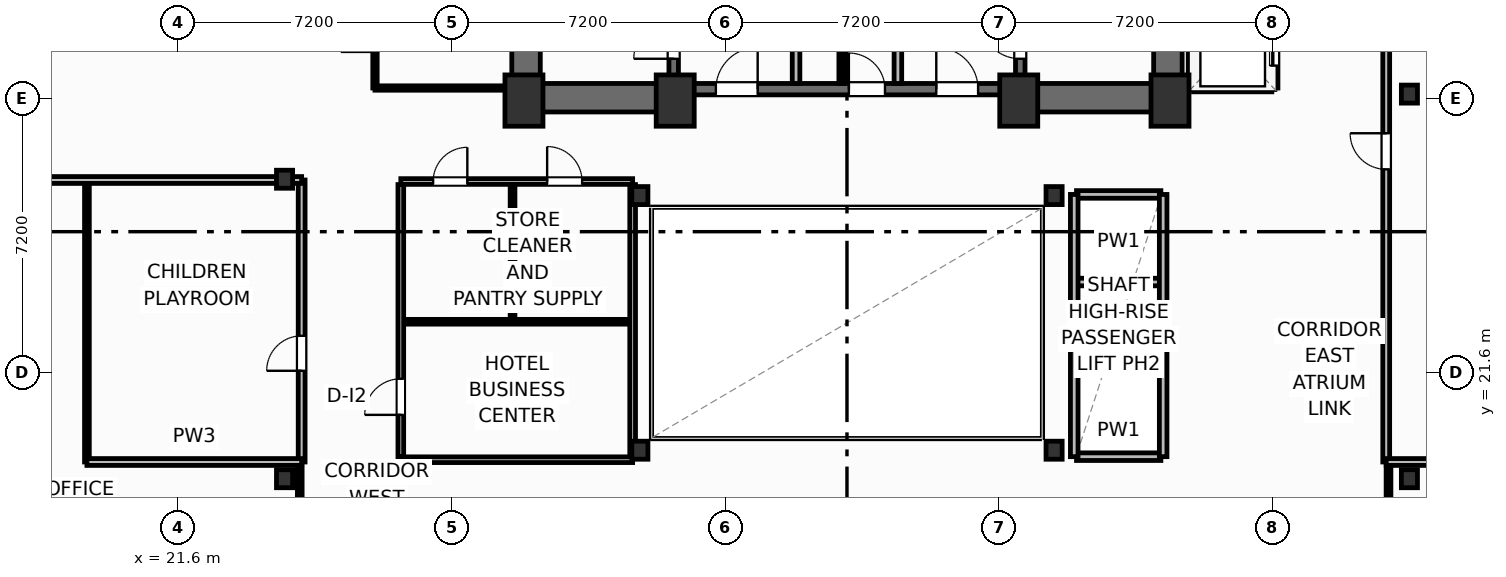
"""IFC4 building model, lengths in metres.
Left out: names, types, materials, properties, quantities, classifications, styles, units other than length and angle.
Written with IfcOpenShell. Run it as: python <this file> out.ifc"""

import sys

from ifc_helpers import new_model, si_unit, direction, frame, frame_2d, origin, origin_2d, place, context, subcontext, project, spatial, rectangle, i_section, extrude, element, fill, save


model = new_model("IFC4")
c1 = context("Model", 3, precision=1e-05, world=origin(), true_north=direction((0.0, 1.0)))
c2 = subcontext(c1, "Body", "Model", "MODEL_VIEW")
j1 = project(units=[si_unit("LENGTHUNIT", "METRE"), si_unit("PLANEANGLEUNIT", "RADIAN")], contexts=[c1])
p1 = place(None, origin())
s1 = spatial("IfcSite", under=j1, at=p1, CompositionType="ELEMENT")
p2 = place(p1, origin())
s2 = spatial("IfcBuilding", under=s1, at=p2, CompositionType="ELEMENT")
p3 = place(p2, frame((0.0, 0.0, 140.2)))
s3 = spatial("IfcBuildingStorey", under=s2, at=p3, CompositionType="ELEMENT", Elevation=140.2)
for number, where, z_axis, x_axis in (
    (1, (30.7, 28.75, 0.0), (0.0, 0.0, 1.0), (1.0, 0.0, 0.0)),
    (2, (34.68, 28.75, 0.0), (0.0, 0.0, 1.0), (1.0, 0.0, 0.0)),
    (3, (43.72, 28.75, 0.0), (0.0, 0.0, 1.0), (1.0, 0.0, 0.0)),
    (4, (47.7, 28.75, 0.0), (0.0, 0.0, 1.0), (1.0, 0.0, 0.0)),
):
    element("IfcColumn", number, at=place(p3, frame(where, z_axis=z_axis, x_axis=x_axis)), inside=s3, PredefinedType="COLUMN", context=c2, shape_type="SweptSolid", body=[
        extrude(rectangle(XDim=1.0, YDim=1.35, at=origin_2d()), origin(), (0.0, 0.0, 1.0), 3.7),
    ])
for number, where, z_axis, x_axis in (
    (5, (33.75, 19.55, 0.0), (0.0, 0.0, 1.0), (1.0, 0.0, 0.0)),
    (6, (44.65, 19.55, 0.0), (0.0, 0.0, 1.0), (1.0, 0.0, 0.0)),
    (7, (33.75, 26.25, 0.0), (0.0, 0.0, 1.0), (1.0, 0.0, 0.0)),
    (8, (44.65, 26.25, 0.0), (0.0, 0.0, 1.0), (1.0, 0.0, 0.0)),
    (9, (24.4, 18.8, 0.0), (0.0, 0.0, 1.0), (1.0, 0.0, 0.0)),
    (10, (24.4, 26.68, 0.0), (0.0, 0.0, 1.0), (1.0, 0.0, 0.0)),
    (11, (54.0, 18.8, 0.0), (0.0, 0.0, 1.0), (1.0, 0.0, 0.0)),
    (12, (54.0, 28.92, 0.0), (0.0, 0.0, 1.0), (1.0, 0.0, 0.0)),
):
    element("IfcColumn", number, at=place(p3, frame(where, z_axis=z_axis, x_axis=x_axis)), inside=s3, PredefinedType="COLUMN", context=c2, shape_type="SweptSolid", body=[
        extrude(i_section(OverallWidth=0.424, OverallDepth=0.474, WebThickness=0.048, FlangeThickness=0.077, FilletRadius=0.025, at=origin_2d()), origin(), (0.0, 0.0, 1.0), 3.7),
    ])
for number, where, z_axis, x_axis in (
    (13, (30.755, 29.2, 0.0), (0.0, 0.0, 1.0), (0.0, 1.0, 0.0)),
    (14, (47.645, 29.2, 0.0), (0.0, 0.0, 1.0), (0.0, 1.0, 0.0)),
):
    element("IfcWall", number, at=place(p3, frame(where, z_axis=z_axis, x_axis=x_axis)), inside=s3, PredefinedType="SHEAR", context=c2, shape_type="SweptSolid", body=[
        extrude(rectangle(XDim=9.22, YDim=0.75, at=frame_2d((4.61, 0.0))), origin(), (0.0, 0.0, 1.0), 3.45),
    ])
p4 = place(p3, frame((30.38, 28.825, 0.0), z_axis=(0.0, 0.0, 1.0), x_axis=(1.0, 0.0, 0.0)))
e15 = element("IfcWall", 15, at=p4, inside=s3, PredefinedType="SHEAR", context=c2, shape_type="SweptSolid", body=[
    extrude(rectangle(XDim=4.42, YDim=0.75, at=frame_2d((2.21, 0.0))), origin(), (0.0, 0.0, 1.0), 3.45),
])
p5 = place(p3, frame((43.6, 28.825, 0.0), z_axis=(0.0, 0.0, 1.0), x_axis=(1.0, 0.0, 0.0)))
e16 = element("IfcWall", 16, at=p5, inside=s3, PredefinedType="SHEAR", context=c2, shape_type="SweptSolid", body=[
    extrude(rectangle(XDim=4.42, YDim=0.75, at=frame_2d((2.21, 0.0))), origin(), (0.0, 0.0, 1.0), 3.45),
])
p6 = place(p3, frame((34.8, 29.05, 0.0), z_axis=(0.0, 0.0, 1.0), x_axis=(1.0, 0.0, 0.0)))
e17 = element("IfcWall", 17, at=p6, inside=s3, PredefinedType="SHEAR", context=c2, shape_type="SweptSolid", body=[
    extrude(rectangle(XDim=8.8, YDim=0.3, at=frame_2d((4.4, 0.0))), origin(), (0.0, 0.0, 1.0), 3.45),
])
p7 = place(p6, frame((0.95, 0.0, 0.0)))
e18 = element("IfcOpeningElement", 18, at=p7, cuts=e17, PredefinedType="OPENING", context=c2, shape_type="SweptSolid", body=[
    extrude(rectangle(XDim=1.1, YDim=2.15, at=frame_2d((0.55, 1.075))), frame((0.0, 0.16, 0.0), z_axis=(0.0, -1.0, 0.0), x_axis=(1.0, 0.0, 0.0)), (0.0, 0.0, 1.0), 0.32),
])
p8 = place(p6, frame((6.75, 0.0, 0.0)))
e19 = element("IfcOpeningElement", 19, at=p8, cuts=e17, PredefinedType="OPENING", context=c2, shape_type="SweptSolid", body=[
    extrude(rectangle(XDim=1.1, YDim=2.15, at=frame_2d((0.55, 1.075))), frame((0.0, 0.16, 0.0), z_axis=(0.0, -1.0, 0.0), x_axis=(1.0, 0.0, 0.0)), (0.0, 0.0, 1.0), 0.32),
])
p9 = place(p6, frame((4.45, 0.0, 0.0)))
e20 = element("IfcOpeningElement", 20, at=p9, cuts=e17, PredefinedType="OPENING", context=c2, shape_type="SweptSolid", body=[
    extrude(rectangle(XDim=0.95, YDim=2.15, at=frame_2d((0.475, 1.075))), frame((0.0, 0.16, 0.0), z_axis=(0.0, -1.0, 0.0), x_axis=(1.0, 0.0, 0.0)), (0.0, 0.0, 1.0), 0.32),
])
p10 = place(p3, frame((34.64, 29.2, 0.0), z_axis=(0.0, 0.0, 1.0), x_axis=(0.0, 1.0, 0.0)))
e21 = element("IfcWall", 21, at=p10, inside=s3, PredefinedType="SHEAR", context=c2, shape_type="SweptSolid", body=[
    extrude(rectangle(XDim=9.22, YDim=0.25, at=frame_2d((4.61, 0.0))), origin(), (0.0, 0.0, 1.0), 3.45),
])
p11 = place(p10, frame((0.65, 0.0, 0.0)))
e22 = element("IfcOpeningElement", 22, at=p11, cuts=e21, PredefinedType="OPENING", context=c2, shape_type="SweptSolid", body=[
    extrude(rectangle(XDim=1.05, YDim=2.15, at=frame_2d((0.525, 1.075))), frame((0.0, 0.135, 0.0), z_axis=(0.0, -1.0, 0.0), x_axis=(1.0, 0.0, 0.0)), (0.0, 0.0, 1.0), 0.27),
])
p12 = place(p3, frame((43.76, 29.2, 0.0), z_axis=(0.0, 0.0, 1.0), x_axis=(0.0, 1.0, 0.0)))
e23 = element("IfcWall", 23, at=p12, inside=s3, PredefinedType="SHEAR", context=c2, shape_type="SweptSolid", body=[
    extrude(rectangle(XDim=9.22, YDim=0.25, at=frame_2d((4.61, 0.0))), origin(), (0.0, 0.0, 1.0), 3.45),
])
p13 = place(p12, frame((0.65, 0.0, 0.0)))
e24 = element("IfcOpeningElement", 24, at=p13, cuts=e23, PredefinedType="OPENING", context=c2, shape_type="SweptSolid", body=[
    extrude(rectangle(XDim=1.05, YDim=2.15, at=frame_2d((0.525, 1.075))), frame((0.0, 0.135, 0.0), z_axis=(0.0, -1.0, 0.0), x_axis=(1.0, 0.0, 0.0)), (0.0, 0.0, 1.0), 0.27),
])
p14 = place(p3, frame((24.8, 16.61, 0.0), z_axis=(0.0, 0.0, 1.0), x_axis=(0.0, 1.0, 0.0)))
e25 = element("IfcWall", 25, at=p14, inside=s3, PredefinedType="PARTITIONING", context=c2, shape_type="SweptSolid", body=[
    extrude(rectangle(XDim=2.63, YDim=0.125, at=frame_2d((1.315, 0.0))), origin(), (0.0, 0.0, 1.0), 2.662),
])
p15 = place(p3, frame((53.45, 16.61, 0.0), z_axis=(0.0, 0.0, 1.0), x_axis=(0.0, 1.0, 0.0)))
e26 = element("IfcWall", 26, at=p15, inside=s3, PredefinedType="PARTITIONING", context=c2, shape_type="SweptSolid", body=[
    extrude(rectangle(XDim=2.63, YDim=0.125, at=frame_2d((1.315, 0.0))), origin(), (0.0, 0.0, 1.0), 3.45),
])
p16 = place(p3, frame((24.85, 19.24, 0.0), z_axis=(0.0, 0.0, 1.0), x_axis=(0.0, 1.0, 0.0)))
e27 = element("IfcWall", 27, at=p16, inside=s3, PredefinedType="PARTITIONING", context=c2, shape_type="SweptSolid", body=[
    extrude(rectangle(XDim=7.42, YDim=0.18, at=frame_2d((3.71, 0.0))), origin(), (0.0, 0.0, 1.0), 3.45),
])
p17 = place(p16, frame((2.4, 0.0, 0.0)))
e28 = element("IfcOpeningElement", 28, at=p17, cuts=e27, PredefinedType="OPENING", context=c2, shape_type="SweptSolid", body=[
    extrude(rectangle(XDim=0.92, YDim=2.05, at=frame_2d((0.46, 1.025))), frame((0.0, 0.1, 0.0), z_axis=(0.0, -1.0, 0.0), x_axis=(1.0, 0.0, 0.0)), (0.0, 0.0, 1.0), 0.2),
])
p18 = place(p3, frame((19.2, 19.24, 0.0), z_axis=(0.0, 0.0, 1.0), x_axis=(0.0, 1.0, 0.0)))
e29 = element("IfcWall", 29, at=p18, inside=s3, PredefinedType="PARTITIONING", context=c2, shape_type="SweptSolid", body=[
    extrude(rectangle(XDim=7.42, YDim=0.125, at=frame_2d((3.71, 0.0))), origin(), (0.0, 0.0, 1.0), 3.45),
])
p19 = place(p3, frame((19.2, 19.24, 0.0), z_axis=(0.0, 0.0, 1.0), x_axis=(1.0, 0.0, 0.0)))
e30 = element("IfcWall", 30, at=p19, inside=s3, PredefinedType="PARTITIONING", context=c2, shape_type="SweptSolid", body=[
    extrude(rectangle(XDim=5.65, YDim=0.18, at=frame_2d((2.825, 0.0))), origin(), (0.0, 0.0, 1.0), 3.45),
])
p20 = place(p3, frame((2.073, 26.66, 0.0), z_axis=(0.0, 0.0, 1.0), x_axis=(1.0, 0.0, 0.0)))
e31 = element("IfcWall", 31, at=p20, inside=s3, PredefinedType="PARTITIONING", context=c2, shape_type="SweptSolid", body=[
    extrude(rectangle(XDim=22.777, YDim=0.18, at=frame_2d((11.388, 0.0))), origin(), (0.0, 0.0, 1.0), 2.662),
])
p21 = place(p3, frame((53.39, 19.24, 0.0), z_axis=(0.0, 0.0, 1.0), x_axis=(0.0, 1.0, 0.0)))
e32 = element("IfcWall", 32, at=p21, inside=s3, PredefinedType="PARTITIONING", context=c2, shape_type="SweptSolid", body=[
    extrude(rectangle(XDim=20.06, YDim=0.18, at=frame_2d((10.03, 0.0))), origin(), (0.0, 0.0, 1.0), 3.45),
])
p22 = place(p21, frame((7.7, 0.0, 0.0)))
e33 = element("IfcOpeningElement", 33, at=p22, cuts=e32, PredefinedType="OPENING", context=c2, shape_type="SweptSolid", body=[
    extrude(rectangle(XDim=0.95, YDim=2.05, at=frame_2d((0.475, 1.025))), frame((0.0, 0.1, 0.0), z_axis=(0.0, -1.0, 0.0), x_axis=(1.0, 0.0, 0.0)), (0.0, 0.0, 1.0), 0.2),
])
p23 = place(p3, frame((53.39, 19.24, 0.0), z_axis=(0.0, 0.0, 1.0), x_axis=(1.0, 0.0, 0.0)))
e34 = element("IfcWall", 34, at=p23, inside=s3, PredefinedType="PARTITIONING", context=c2, shape_type="SweptSolid", body=[
    extrude(rectangle(XDim=22.367, YDim=0.18, at=frame_2d((11.183, 0.0))), origin(), (0.0, 0.0, 1.0), 2.662),
])
for number, where, z_axis, x_axis in (
    (35, (37.86, 29.2, 0.0), (0.0, 0.0, 1.0), (0.0, 1.0, 0.0)),
    (36, (40.54, 29.2, 0.0), (0.0, 0.0, 1.0), (0.0, 1.0, 0.0)),
):
    element("IfcWall", number, at=place(p3, frame(where, z_axis=z_axis, x_axis=x_axis)), inside=s3, PredefinedType="PARTITIONING", context=c2, shape_type="SweptSolid", body=[
        extrude(rectangle(XDim=5.18, YDim=0.2, at=frame_2d((2.59, 0.0))), origin(), (0.0, 0.0, 1.0), 3.45),
    ])
p24 = place(p3, frame((39.05, 29.2, 0.0), z_axis=(0.0, 0.0, 1.0), x_axis=(0.0, 1.0, 0.0)))
e37 = element("IfcWall", 37, at=p24, inside=s3, PredefinedType="PARTITIONING", context=c2, shape_type="SweptSolid", body=[
    extrude(rectangle(XDim=5.22, YDim=0.125, at=frame_2d((2.61, 0.0))), origin(), (0.0, 0.0, 1.0), 3.45),
])
p25 = place(p24, frame((2.05, 0.0, 0.0)))
e38 = element("IfcOpeningElement", 38, at=p25, cuts=e37, PredefinedType="OPENING", context=c2, shape_type="SweptSolid", body=[
    extrude(rectangle(XDim=0.85, YDim=2.05, at=frame_2d((0.425, 1.025))), frame((0.0, 0.073, 0.0), z_axis=(0.0, -1.0, 0.0), x_axis=(1.0, 0.0, 0.0)), (0.0, 0.0, 1.0), 0.145),
])
p26 = place(p3, frame((27.46, 19.3, 0.0), z_axis=(0.0, 0.0, 1.0), x_axis=(1.0, 0.0, 0.0)))
e39 = element("IfcWall", 39, at=p26, inside=s3, PredefinedType="PARTITIONING", context=c2, shape_type="SweptSolid", body=[
    extrude(rectangle(XDim=6.1, YDim=0.15, at=frame_2d((3.05, 0.0))), origin(), (0.0, 0.0, 1.0), 2.662),
])
p27 = place(p3, frame((27.46, 26.62, 0.0), z_axis=(0.0, 0.0, 1.0), x_axis=(1.0, 0.0, 0.0)))
e40 = element("IfcWall", 40, at=p27, inside=s3, PredefinedType="PARTITIONING", context=c2, shape_type="SweptSolid", body=[
    extrude(rectangle(XDim=6.1, YDim=0.15, at=frame_2d((3.05, 0.0))), origin(), (0.0, 0.0, 1.0), 2.662),
])
p28 = place(p27, frame((0.85, 0.0, 0.0)))
e41 = element("IfcOpeningElement", 41, at=p28, cuts=e40, PredefinedType="OPENING", context=c2, shape_type="SweptSolid", body=[
    extrude(rectangle(XDim=0.9, YDim=2.05, at=frame_2d((0.45, 1.025))), frame((0.0, 0.085, 0.0), z_axis=(0.0, -1.0, 0.0), x_axis=(1.0, 0.0, 0.0)), (0.0, 0.0, 1.0), 0.17),
])
p29 = place(p27, frame((3.85, 0.0, 0.0)))
e42 = element("IfcOpeningElement", 42, at=p29, cuts=e40, PredefinedType="OPENING", context=c2, shape_type="SweptSolid", body=[
    extrude(rectangle(XDim=0.92, YDim=2.05, at=frame_2d((0.46, 1.025))), frame((0.0, 0.085, 0.0), z_axis=(0.0, -1.0, 0.0), x_axis=(1.0, 0.0, 0.0)), (0.0, 0.0, 1.0), 0.17),
])
p30 = place(p3, frame((27.52, 22.93, 0.0), z_axis=(0.0, 0.0, 1.0), x_axis=(1.0, 0.0, 0.0)))
e43 = element("IfcWall", 43, at=p30, inside=s3, PredefinedType="PARTITIONING", context=c2, shape_type="SweptSolid", body=[
    extrude(rectangle(XDim=6.0, YDim=0.125, at=frame_2d((3.0, 0.0))), origin(), (0.0, 0.0, 1.0), 3.45),
])
p31 = place(p3, frame((30.4, 23.0, 0.0), z_axis=(0.0, 0.0, 1.0), x_axis=(0.0, 1.0, 0.0)))
e44 = element("IfcWall", 44, at=p31, inside=s3, PredefinedType="PARTITIONING", context=c2, shape_type="SweptSolid", body=[
    extrude(rectangle(XDim=3.54, YDim=0.125, at=frame_2d((1.77, 0.0))), origin(), (0.0, 0.0, 1.0), 3.45),
])
p32 = place(p3, frame((27.46, 19.38, 0.0), z_axis=(0.0, 0.0, 1.0), x_axis=(0.0, 1.0, 0.0)))
e45 = element("IfcWall", 45, at=p32, inside=s3, PredefinedType="PARTITIONING", context=c2, shape_type="SweptSolid", body=[
    extrude(rectangle(XDim=7.16, YDim=0.15, at=frame_2d((3.58, 0.0))), origin(), (0.0, 0.0, 1.0), 3.45),
])
p33 = place(p32, frame((1.1, 0.0, 0.0)))
e46 = element("IfcOpeningElement", 46, at=p33, cuts=e45, PredefinedType="OPENING", context=c2, shape_type="SweptSolid", body=[
    extrude(rectangle(XDim=0.95, YDim=2.05, at=frame_2d((0.475, 1.025))), frame((0.0, 0.085, 0.0), z_axis=(0.0, -1.0, 0.0), x_axis=(1.0, 0.0, 0.0)), (0.0, 0.0, 1.0), 0.17),
])
p34 = place(p3, frame((33.56, 19.38, 0.0), z_axis=(0.0, 0.0, 1.0), x_axis=(0.0, 1.0, 0.0)))
e47 = element("IfcWall", 47, at=p34, inside=s3, PredefinedType="PARTITIONING", context=c2, shape_type="SweptSolid", body=[
    extrude(rectangle(XDim=7.16, YDim=0.15, at=frame_2d((3.58, 0.0))), origin(), (0.0, 0.0, 1.0), 2.824),
])
p35 = place(p3, frame((26.78, 29.08, 0.0), z_axis=(0.0, 0.0, 1.0), x_axis=(1.0, 0.0, 0.0)))
e48 = element("IfcWall", 48, at=p35, inside=s3, PredefinedType="PARTITIONING", context=c2, shape_type="SweptSolid", body=[
    extrude(rectangle(XDim=3.6, YDim=0.115, at=frame_2d((1.8, 0.0))), origin(), (0.0, 0.0, 1.0), 3.45),
])
p36 = place(p3, frame((26.78, 29.08, 0.0), z_axis=(0.0, 0.0, 1.0), x_axis=(0.0, 1.0, 0.0)))
e49 = element("IfcWall", 49, at=p36, inside=s3, PredefinedType="PARTITIONING", context=c2, shape_type="SweptSolid", body=[
    extrude(rectangle(XDim=3.11, YDim=0.115, at=frame_2d((1.555, 0.0))), origin(), (0.0, 0.0, 1.0), 3.45),
])
p37 = place(p36, frame((0.95, 0.0, 0.0)))
e50 = element("IfcOpeningElement", 50, at=p37, cuts=e49, PredefinedType="OPENING", context=c2, shape_type="SweptSolid", body=[
    extrude(rectangle(XDim=0.9, YDim=2.05, at=frame_2d((0.45, 1.025))), frame((0.0, 0.067, 0.0), z_axis=(0.0, -1.0, 0.0), x_axis=(1.0, 0.0, 0.0)), (0.0, 0.0, 1.0), 0.135),
])
p38 = place(p3, frame((48.32, 29.08, 0.0), z_axis=(0.0, 0.0, 1.0), x_axis=(1.0, 0.0, 0.0)))
e51 = element("IfcWall", 51, at=p38, inside=s3, PredefinedType="PARTITIONING", context=c2, shape_type="SweptSolid", body=[
    extrude(rectangle(XDim=2.06, YDim=0.2, at=frame_2d((1.03, 0.0))), origin(), (0.0, 0.0, 1.0), 2.662),
])
p39 = place(p3, frame((48.28, 29.08, 0.0), z_axis=(0.0, 0.0, 1.0), x_axis=(0.0, 1.0, 0.0)))
e52 = element("IfcWall", 52, at=p39, inside=s3, PredefinedType="PARTITIONING", context=c2, shape_type="SweptSolid", body=[
    extrude(rectangle(XDim=6.89, YDim=0.2, at=frame_2d((3.445, 0.0))), origin(), (0.0, 0.0, 1.0), 3.45),
])
p40 = place(p3, frame((50.44, 29.08, 0.0), z_axis=(0.0, 0.0, 1.0), x_axis=(0.0, 1.0, 0.0)))
e53 = element("IfcWall", 53, at=p40, inside=s3, PredefinedType="PARTITIONING", context=c2, shape_type="SweptSolid", body=[
    extrude(rectangle(XDim=6.89, YDim=0.2, at=frame_2d((3.445, 0.0))), origin(), (0.0, 0.0, 1.0), 3.45),
])
p41 = place(p40, frame((0.59, 0.0, 0.0)))
e54 = element("IfcOpeningElement", 54, at=p41, cuts=e53, PredefinedType="OPENING", context=c2, shape_type="SweptSolid", body=[
    extrude(rectangle(XDim=1.1, YDim=2.15, at=frame_2d((0.55, 1.075))), frame((0.0, 0.11, 0.0), z_axis=(0.0, -1.0, 0.0), x_axis=(1.0, 0.0, 0.0)), (0.0, 0.0, 1.0), 0.22),
])
p42 = place(p40, frame((2.89, 0.0, 0.0)))
e55 = element("IfcOpeningElement", 55, at=p42, cuts=e53, PredefinedType="OPENING", context=c2, shape_type="SweptSolid", body=[
    extrude(rectangle(XDim=1.1, YDim=2.15, at=frame_2d((0.55, 1.075))), frame((0.0, 0.11, 0.0), z_axis=(0.0, -1.0, 0.0), x_axis=(1.0, 0.0, 0.0)), (0.0, 0.0, 1.0), 0.22),
])
p43 = place(p40, frame((5.19, 0.0, 0.0)))
e56 = element("IfcOpeningElement", 56, at=p43, cuts=e53, PredefinedType="OPENING", context=c2, shape_type="SweptSolid", body=[
    extrude(rectangle(XDim=1.1, YDim=2.15, at=frame_2d((0.55, 1.075))), frame((0.0, 0.11, 0.0), z_axis=(0.0, -1.0, 0.0), x_axis=(1.0, 0.0, 0.0)), (0.0, 0.0, 1.0), 0.22),
])
for number, where, z_axis, x_axis in (
    (57, (45.24, 21.675, 0.0), (0.0, 0.0, 1.0), (1.0, 0.0, 0.0)),
    (58, (45.24, 23.975, 0.0), (0.0, 0.0, 1.0), (1.0, 0.0, 0.0)),
):
    element("IfcWall", number, at=place(p3, frame(where, z_axis=z_axis, x_axis=x_axis)), inside=s3, PredefinedType="PARTITIONING", context=c2, shape_type="SweptSolid", body=[
        extrude(rectangle(XDim=2.22, YDim=0.2, at=frame_2d((1.11, 0.0))), origin(), (0.0, 0.0, 1.0), 3.45),
    ])
p44 = place(p3, frame((45.24, 19.38, 0.0), z_axis=(0.0, 0.0, 1.0), x_axis=(1.0, 0.0, 0.0)))
e59 = element("IfcWall", 59, at=p44, inside=s3, PredefinedType="PARTITIONING", context=c2, shape_type="SweptSolid", body=[
    extrude(rectangle(XDim=2.22, YDim=0.2, at=frame_2d((1.11, 0.0))), origin(), (0.0, 0.0, 1.0), 2.662),
])
p45 = place(p3, frame((45.24, 26.28, 0.0), z_axis=(0.0, 0.0, 1.0), x_axis=(1.0, 0.0, 0.0)))
e60 = element("IfcWall", 60, at=p45, inside=s3, PredefinedType="PARTITIONING", context=c2, shape_type="SweptSolid", body=[
    extrude(rectangle(XDim=2.22, YDim=0.2, at=frame_2d((1.11, 0.0))), origin(), (0.0, 0.0, 1.0), 3.45),
])
for number, where, z_axis, x_axis in (
    (61, (45.18, 19.38, 0.0), (0.0, 0.0, 1.0), (0.0, 1.0, 0.0)),
    (62, (47.52, 19.38, 0.0), (0.0, 0.0, 1.0), (0.0, 1.0, 0.0)),
):
    element("IfcWall", number, at=place(p3, frame(where, z_axis=z_axis, x_axis=x_axis)), inside=s3, PredefinedType="PARTITIONING", context=c2, shape_type="SweptSolid", body=[
        extrude(rectangle(XDim=6.9, YDim=0.2, at=frame_2d((3.45, 0.0))), origin(), (0.0, 0.0, 1.0), 3.45),
    ])
p46 = place(p17, origin())
e63 = element("IfcDoor", 63, at=p46, inside=s3, OperationType="SINGLE_SWING_LEFT", PredefinedType="DOOR", context=c2, shape_type="SweptSolid", body=[
    extrude(rectangle(XDim=0.92, YDim=2.05, at=frame_2d((0.46, 1.025))), frame((0.0, 0.025, 0.0), z_axis=(0.0, -1.0, 0.0), x_axis=(1.0, 0.0, 0.0)), (0.0, 0.0, 1.0), 0.05),
])
fill(e28, e63)
p47 = place(p22, origin())
e64 = element("IfcDoor", 64, at=p47, inside=s3, OperationType="SINGLE_SWING_RIGHT", PredefinedType="DOOR", context=c2, shape_type="SweptSolid", body=[
    extrude(rectangle(XDim=0.95, YDim=2.05, at=frame_2d((0.475, 1.025))), frame((0.0, 0.025, 0.0), z_axis=(0.0, -1.0, 0.0), x_axis=(1.0, 0.0, 0.0)), (0.0, 0.0, 1.0), 0.05),
])
fill(e33, e64)
p48 = place(p11, origin())
e65 = element("IfcDoor", 65, at=p48, inside=s3, OperationType="SINGLE_SWING_LEFT", PredefinedType="DOOR", context=c2, shape_type="SweptSolid", body=[
    extrude(rectangle(XDim=1.05, YDim=2.15, at=frame_2d((0.525, 1.075))), frame((0.0, 0.025, 0.0), z_axis=(0.0, -1.0, 0.0), x_axis=(1.0, 0.0, 0.0)), (0.0, 0.0, 1.0), 0.05),
])
fill(e22, e65)
p49 = place(p13, origin())
e66 = element("IfcDoor", 66, at=p49, inside=s3, OperationType="SINGLE_SWING_RIGHT", PredefinedType="DOOR", context=c2, shape_type="SweptSolid", body=[
    extrude(rectangle(XDim=1.05, YDim=2.15, at=frame_2d((0.525, 1.075))), frame((0.0, 0.025, 0.0), z_axis=(0.0, -1.0, 0.0), x_axis=(1.0, 0.0, 0.0)), (0.0, 0.0, 1.0), 0.05),
])
fill(e24, e66)
p50 = place(p7, origin())
e67 = element("IfcDoor", 67, at=p50, inside=s3, OperationType="SINGLE_SWING_RIGHT", PredefinedType="DOOR", context=c2, shape_type="SweptSolid", body=[
    extrude(rectangle(XDim=1.1, YDim=2.15, at=frame_2d((0.55, 1.075))), frame((0.0, 0.025, 0.0), z_axis=(0.0, -1.0, 0.0), x_axis=(1.0, 0.0, 0.0)), (0.0, 0.0, 1.0), 0.05),
])
fill(e18, e67)
p51 = place(p8, origin())
e68 = element("IfcDoor", 68, at=p51, inside=s3, OperationType="SINGLE_SWING_LEFT", PredefinedType="DOOR", context=c2, shape_type="SweptSolid", body=[
    extrude(rectangle(XDim=1.1, YDim=2.15, at=frame_2d((0.55, 1.075))), frame((0.0, 0.025, 0.0), z_axis=(0.0, -1.0, 0.0), x_axis=(1.0, 0.0, 0.0)), (0.0, 0.0, 1.0), 0.05),
])
fill(e19, e68)
p52 = place(p9, origin())
e69 = element("IfcDoor", 69, at=p52, inside=s3, OperationType="SINGLE_SWING_LEFT", PredefinedType="DOOR", context=c2, shape_type="SweptSolid", body=[
    extrude(rectangle(XDim=0.95, YDim=2.15, at=frame_2d((0.475, 1.075))), frame((0.0, 0.025, 0.0), z_axis=(0.0, -1.0, 0.0), x_axis=(1.0, 0.0, 0.0)), (0.0, 0.0, 1.0), 0.05),
])
fill(e20, e69)
p53 = place(p28, origin())
e70 = element("IfcDoor", 70, at=p53, inside=s3, OperationType="SINGLE_SWING_RIGHT", PredefinedType="DOOR", context=c2, shape_type="SweptSolid", body=[
    extrude(rectangle(XDim=0.9, YDim=2.05, at=frame_2d((0.45, 1.025))), frame((0.0, 0.025, 0.0), z_axis=(0.0, -1.0, 0.0), x_axis=(1.0, 0.0, 0.0)), (0.0, 0.0, 1.0), 0.05),
])
fill(e41, e70)
p54 = place(p29, origin())
e71 = element("IfcDoor", 71, at=p54, inside=s3, OperationType="SINGLE_SWING_LEFT", PredefinedType="DOOR", context=c2, shape_type="SweptSolid", body=[
    extrude(rectangle(XDim=0.92, YDim=2.05, at=frame_2d((0.46, 1.025))), frame((0.0, 0.025, 0.0), z_axis=(0.0, -1.0, 0.0), x_axis=(1.0, 0.0, 0.0)), (0.0, 0.0, 1.0), 0.05),
])
fill(e42, e71)
p55 = place(p33, origin())
e72 = element("IfcDoor", 72, at=p55, inside=s3, OperationType="SINGLE_SWING_LEFT", PredefinedType="DOOR", context=c2, shape_type="SweptSolid", body=[
    extrude(rectangle(XDim=0.95, YDim=2.05, at=frame_2d((0.475, 1.025))), frame((0.0, 0.025, 0.0), z_axis=(0.0, -1.0, 0.0), x_axis=(1.0, 0.0, 0.0)), (0.0, 0.0, 1.0), 0.05),
])
fill(e46, e72)
p56 = place(p41, origin())
e73 = element("IfcDoor", 73, at=p56, inside=s3, OperationType="SLIDING_TO_LEFT", PredefinedType="DOOR", context=c2, shape_type="SweptSolid", body=[
    extrude(rectangle(XDim=1.1, YDim=2.15, at=frame_2d((0.55, 1.075))), frame((0.0, 0.025, 0.0), z_axis=(0.0, -1.0, 0.0), x_axis=(1.0, 0.0, 0.0)), (0.0, 0.0, 1.0), 0.05),
])
fill(e54, e73)
save(model, sys.argv[1])
